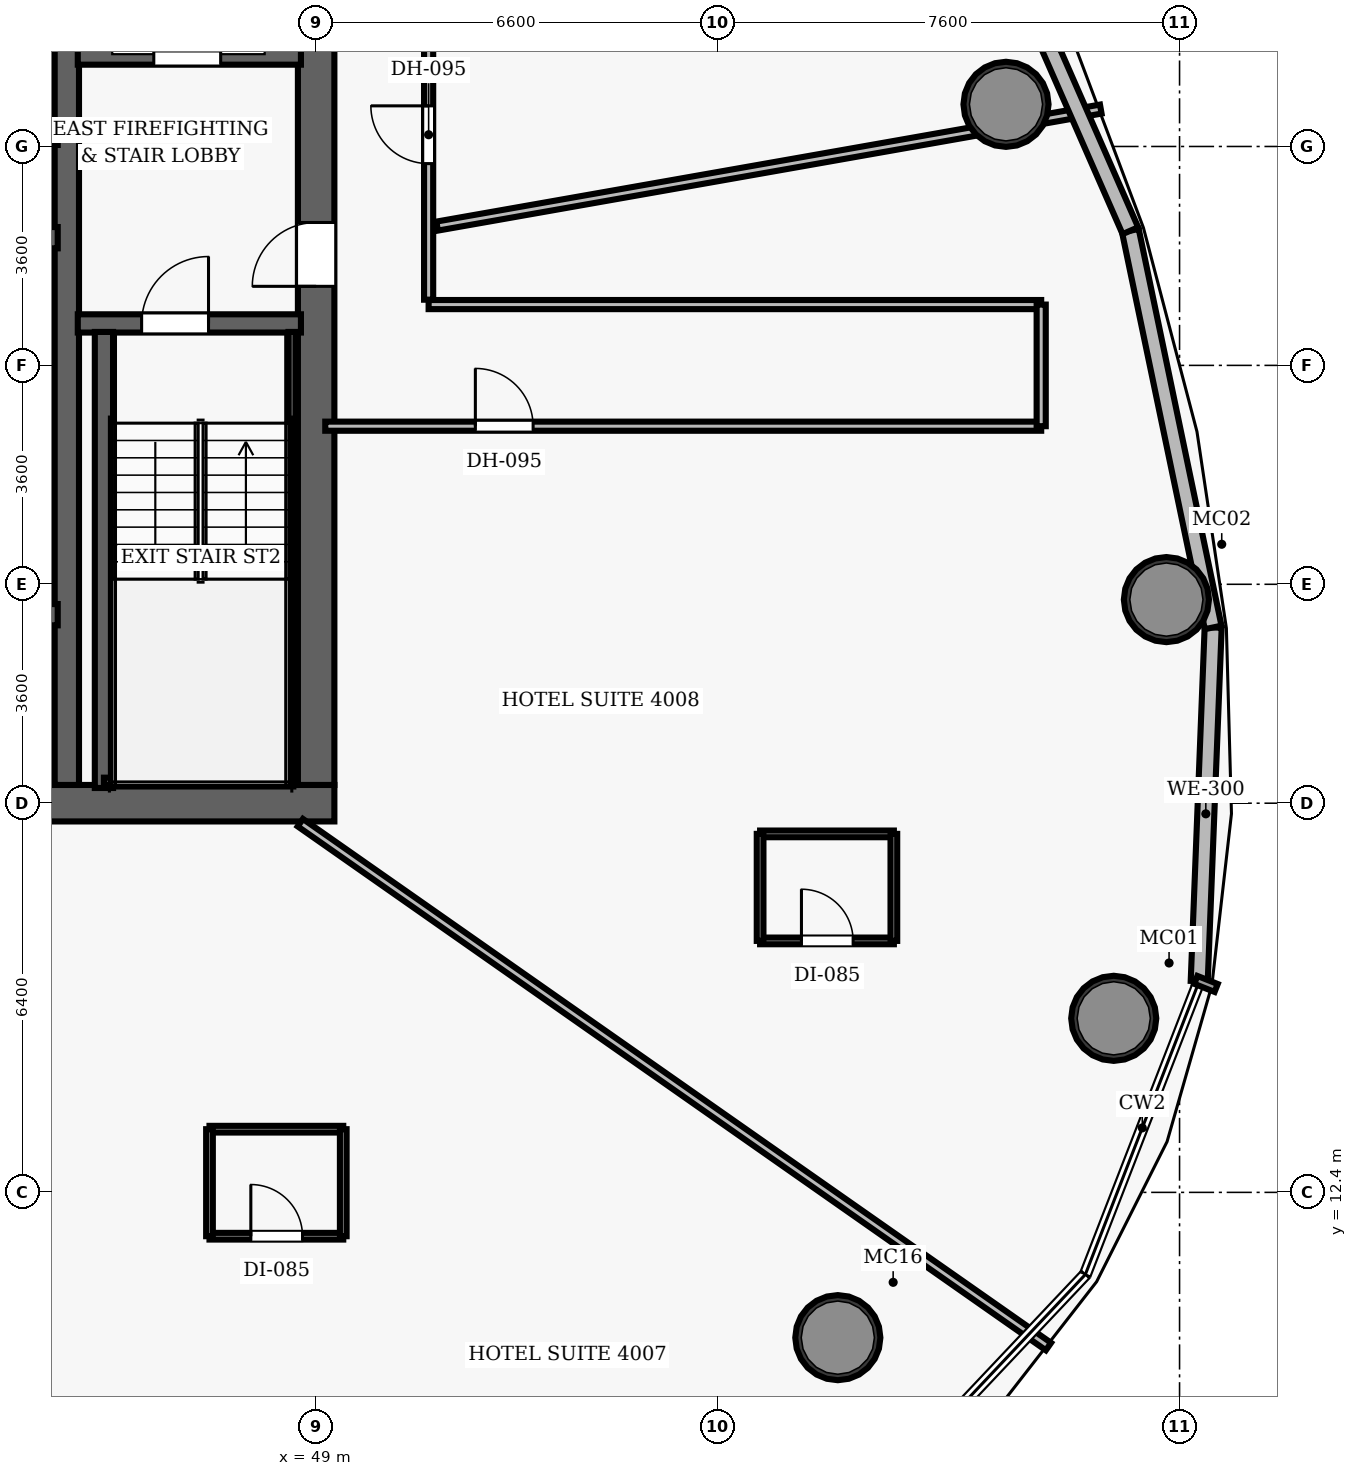
"""IFC4 building model, lengths in metres.
Left out: names, types, materials, properties, quantities, classifications, styles, units other than length and angle.
Written with IfcOpenShell. Run it as: python <this file> out.ifc"""

import sys

from ifc_helpers import new_model, si_unit, direction, frame, frame_2d, origin, origin_2d, place, context, subcontext, project, spatial, rectangle, hollow_circle, extrude, element, fill, save


model = new_model("IFC4")
c1 = context("Model", 3, precision=1e-05, world=origin(), true_north=direction((0.0, 1.0)))
c2 = subcontext(c1, "Body", "Model", "MODEL_VIEW")
j1 = project(units=[si_unit("LENGTHUNIT", "METRE"), si_unit("PLANEANGLEUNIT", "RADIAN")], contexts=[c1])
p1 = place(None, origin())
s1 = spatial("IfcSite", under=j1, at=p1, CompositionType="ELEMENT")
p2 = place(p1, origin())
s2 = spatial("IfcBuilding", under=s1, at=p2, CompositionType="ELEMENT")
p3 = place(p2, frame((0.0, 0.0, 158.8)))
s3 = spatial("IfcBuildingStorey", under=s2, at=p3, CompositionType="ELEMENT", Elevation=158.8)
p4 = place(p3, frame((26.7, 18.8, 0.0), z_axis=(0.0, 0.0, 1.0), x_axis=(1.0, 0.0, 0.0)))
e1 = element("IfcWall", 1, at=p4, inside=s3, PredefinedType="SHEAR", context=c2, shape_type="SweptSolid", body=[
    extrude(rectangle(XDim=22.6, YDim=0.6, at=frame_2d((11.3, 0.0))), origin(), (0.0, 0.0, 1.0), 3.5),
])
p5 = place(p4, frame((14.52, 0.0, 0.0)))
e2 = element("IfcOpeningElement", 2, at=p5, cuts=e1, PredefinedType="OPENING", context=c2, shape_type="SweptSolid", body=[
    extrude(rectangle(XDim=1.05, YDim=2.15, at=frame_2d((0.525, 1.075))), frame((0.0, 0.31, 0.0), z_axis=(0.0, -1.0, 0.0), x_axis=(1.0, 0.0, 0.0)), (0.0, 0.0, 1.0), 0.62),
])
p6 = place(p3, frame((49.0, 19.1, 0.0), z_axis=(0.0, 0.0, 1.0), x_axis=(0.0, 1.0, 0.0)))
e3 = element("IfcWall", 3, at=p6, inside=s3, PredefinedType="SHEAR", context=c2, shape_type="SweptSolid", body=[
    extrude(rectangle(XDim=13.8, YDim=0.6, at=frame_2d((6.9, 0.0))), origin(), (0.0, 0.0, 1.0), 3.5),
])
p7 = place(p6, frame((8.2, 0.0, 0.0)))
e4 = element("IfcOpeningElement", 4, at=p7, cuts=e3, PredefinedType="OPENING", context=c2, shape_type="SweptSolid", body=[
    extrude(rectangle(XDim=1.05, YDim=2.15, at=frame_2d((0.525, 1.075))), frame((0.0, 0.31, 0.0), z_axis=(0.0, -1.0, 0.0), x_axis=(1.0, 0.0, 0.0)), (0.0, 0.0, 1.0), 0.62),
])
p8 = place(p3, frame((44.9, 19.1, 0.0), z_axis=(0.0, 0.0, 1.0), x_axis=(0.0, 1.0, 0.0)))
e5 = element("IfcWall", 5, at=p8, inside=s3, PredefinedType="SHEAR", context=c2, shape_type="SweptSolid", body=[
    extrude(rectangle(XDim=13.8, YDim=0.4, at=frame_2d((6.9, 0.0))), origin(), (0.0, 0.0, 1.0), 3.5),
])
for number, where, z_axis, x_axis in (
    (6, (62.118, 15.262, 0.0), (0.0, 0.0, 1.0), (1.0, 0.0, 0.0)),
    (7, (62.984, 22.148, 0.0), (0.0, 0.0, 1.0), (1.0, 0.0, 0.0)),
    (8, (60.346, 30.293, 0.0), (0.0, 0.0, 1.0), (1.0, 0.0, 0.0)),
    (9, (57.58, 10.011, 0.0), (0.0, 0.0, 1.0), (1.0, 0.0, 0.0)),
):
    element("IfcColumn", number, at=place(p3, frame(where, z_axis=z_axis, x_axis=x_axis)), inside=s3, PredefinedType="COLUMN", context=c2, shape_type="SweptSolid", body=[
        extrude(hollow_circle(Radius=0.7, WallThickness=0.055, at=origin_2d()), origin(), (0.0, 0.0, 1.0), 3.5),
    ])
p9 = place(p3, frame((45.08, 26.69, 0.0), z_axis=(0.0, 0.0, 1.0), x_axis=(1.0, 0.0, 0.0)))
e10 = element("IfcWall", 10, at=p9, inside=s3, PredefinedType="SHEAR", context=c2, shape_type="SweptSolid", body=[
    extrude(rectangle(XDim=3.67, YDim=0.3, at=frame_2d((1.835, 0.0))), origin(), (0.0, 0.0, 1.0), 3.5),
])
p10 = place(p9, frame((1.05, 0.0, 0.0)))
e11 = element("IfcOpeningElement", 11, at=p10, cuts=e10, PredefinedType="OPENING", context=c2, shape_type="SweptSolid", body=[
    extrude(rectangle(XDim=1.1, YDim=2.15, at=frame_2d((0.55, 1.075))), frame((0.0, 0.16, 0.0), z_axis=(0.0, -1.0, 0.0), x_axis=(1.0, 0.0, 0.0)), (0.0, 0.0, 1.0), 0.32),
])
p11 = place(p3, frame((45.51, 19.05, 0.0), z_axis=(0.0, 0.0, 1.0), x_axis=(0.0, 1.0, 0.0)))
e12 = element("IfcWall", 12, at=p11, inside=s3, PredefinedType="SHEAR", context=c2, shape_type="SweptSolid", body=[
    extrude(rectangle(XDim=7.5, YDim=0.3, at=frame_2d((3.75, 0.0))), origin(), (0.0, 0.0, 1.0), 3.5),
])
p12 = place(p3, frame((48.605, 19.1, 0.0), z_axis=(0.0, 0.0, 1.0), x_axis=(0.0, 1.0, 0.0)))
e13 = element("IfcWall", 13, at=p12, inside=s3, PredefinedType="SHEAR", context=c2, shape_type="SweptSolid", body=[
    extrude(rectangle(XDim=7.45, YDim=0.12, at=frame_2d((3.725, 0.0))), origin(), (0.0, 0.0, 1.0), 3.5),
])
p13 = place(p3, frame((45.51, 19.16, 0.0), z_axis=(0.0, 0.0, 1.0), x_axis=(1.0, 0.0, 0.0)))
e14 = element("IfcWall", 14, at=p13, inside=s3, PredefinedType="SHEAR", context=c2, shape_type="SweptSolid", body=[
    extrude(rectangle(XDim=3.095, YDim=0.12, at=frame_2d((1.547, 0.0))), origin(), (0.0, 0.0, 1.0), 3.5),
])
p14 = place(p3, frame((45.08, 31.12, 0.0), z_axis=(0.0, 0.0, 1.0), x_axis=(1.0, 0.0, 0.0)))
e15 = element("IfcWall", 15, at=p14, inside=s3, PredefinedType="SHEAR", context=c2, shape_type="SweptSolid", body=[
    extrude(rectangle(XDim=3.67, YDim=0.35, at=frame_2d((1.835, 0.0))), origin(), (0.0, 0.0, 1.0), 2.675),
])
p15 = place(p14, frame((1.25, 0.0, 0.0)))
e16 = element("IfcOpeningElement", 16, at=p15, cuts=e15, PredefinedType="OPENING", context=c2, shape_type="SweptSolid", body=[
    extrude(rectangle(XDim=1.1, YDim=2.15, at=frame_2d((0.55, 1.075))), frame((0.0, 0.185, 0.0), z_axis=(0.0, -1.0, 0.0), x_axis=(1.0, 0.0, 0.0)), (0.0, 0.0, 1.0), 0.37),
])
for number, where, z_axis, x_axis in (
    (17, (42.72, 21.9, 0.0), (0.0, 0.0, 1.0), (1.0, 0.0, 0.0)),
    (18, (42.72, 28.1, 0.0), (0.0, 0.0, 1.0), (1.0, 0.0, 0.0)),
):
    element("IfcWall", number, at=place(p3, frame(where, z_axis=z_axis, x_axis=x_axis)), inside=s3, PredefinedType="SHEAR", context=c2, shape_type="SweptSolid", body=[
        extrude(rectangle(XDim=2.03, YDim=0.35, at=frame_2d((1.015, 0.0))), origin(), (0.0, 0.0, 1.0), 2.675),
    ])
p16 = place(p3, frame((42.55, 29.68, 0.0), z_axis=(0.0, 0.0, 1.0), x_axis=(1.0, 0.0, 0.0)))
e19 = element("IfcWall", 19, at=p16, inside=s3, PredefinedType="PARTITIONING", context=c2, shape_type="SweptSolid", body=[
    extrude(rectangle(XDim=2.2, YDim=0.11, at=frame_2d((1.1, 0.0))), origin(), (0.0, 0.0, 1.0), 2.675),
])
p17 = place(p3, frame((50.85, 27.08, 0.0), z_axis=(0.0, 0.0, 1.0), x_axis=(0.0, 1.0, 0.0)))
e20 = element("IfcWall", 20, at=p17, inside=s3, PredefinedType="PARTITIONING", context=c2, shape_type="SweptSolid", body=[
    extrude(rectangle(XDim=8.12, YDim=0.15, at=frame_2d((4.06, 0.0))), origin(), (0.0, 0.0, 1.0), 2.675),
])
p18 = place(p17, frame((2.238, 0.0, 0.0)))
e21 = element("IfcOpeningElement", 21, at=p18, cuts=e20, PredefinedType="OPENING", context=c2, shape_type="SweptSolid", body=[
    extrude(rectangle(XDim=0.95, YDim=2.15, at=frame_2d((0.475, 1.075))), frame((0.0, 0.085, 0.0), z_axis=(0.0, -1.0, 0.0), x_axis=(1.0, 0.0, 0.0)), (0.0, 0.0, 1.0), 0.17),
])
p19 = place(p3, frame((50.85, 27.0, 0.0), z_axis=(0.0, 0.0, 1.0), x_axis=(1.0, 0.0, 0.0)))
e22 = element("IfcWall", 22, at=p19, inside=s3, PredefinedType="PARTITIONING", context=c2, shape_type="SweptSolid", body=[
    extrude(rectangle(XDim=10.074, YDim=0.15, at=frame_2d((5.037, 0.0))), origin(), (0.0, 0.0, 1.0), 2.675),
])
p20 = place(p3, frame((49.15, 25.0, 0.0), z_axis=(0.0, 0.0, 1.0), x_axis=(1.0, 0.0, 0.0)))
e23 = element("IfcWall", 23, at=p20, inside=s3, PredefinedType="PARTITIONING", context=c2, shape_type="SweptSolid", body=[
    extrude(rectangle(XDim=11.775, YDim=0.15, at=frame_2d((5.887, 0.0))), origin(), (0.0, 0.0, 1.0), 2.675),
])
p21 = place(p20, frame((2.469, 0.0, 0.0)))
e24 = element("IfcOpeningElement", 24, at=p21, cuts=e23, PredefinedType="OPENING", context=c2, shape_type="SweptSolid", body=[
    extrude(rectangle(XDim=0.95, YDim=2.15, at=frame_2d((0.475, 1.075))), frame((0.0, 0.085, 0.0), z_axis=(0.0, -1.0, 0.0), x_axis=(1.0, 0.0, 0.0)), (0.0, 0.0, 1.0), 0.17),
])
p22 = place(p3, frame((60.925, 25.0, 0.0), z_axis=(0.0, 0.0, 1.0), x_axis=(0.0, 1.0, 0.0)))
e25 = element("IfcWall", 25, at=p22, inside=s3, PredefinedType="PARTITIONING", context=c2, shape_type="SweptSolid", body=[
    extrude(rectangle(XDim=2.0, YDim=0.15, at=frame_2d((1.0, 0.0))), origin(), (0.0, 0.0, 1.0), 2.675),
])
p23 = place(p3, frame((50.99, 28.291, 0.0), z_axis=(0.0, 0.0, 1.0), x_axis=(0.984807278352, 0.173650869576, 0.0)))
e26 = element("IfcWall", 26, at=p23, inside=s3, PredefinedType="PARTITIONING", context=c2, shape_type="SweptSolid", body=[
    extrude(rectangle(XDim=11.083, YDim=0.15, at=frame_2d((5.542, 0.0))), origin(), (0.0, 0.0, 1.0), 2.675),
])
p24 = place(p3, frame((48.74, 18.48, 0.0), z_axis=(0.0, 0.0, 1.0), x_axis=(0.819152498756, -0.573575787305, 0.0)))
e27 = element("IfcWall", 27, at=p24, inside=s3, PredefinedType="PARTITIONING", context=c2, shape_type="SweptSolid", body=[
    extrude(rectangle(XDim=15.021, YDim=0.15, at=frame_2d((7.51, 0.0))), origin(), (0.0, 0.0, 1.0), 2.675),
])
p25 = place(p3, frame((47.246, 11.679, 0.0), z_axis=(0.0, 0.0, 1.0), x_axis=(1.0, 0.0, 0.0)))
e28 = element("IfcWall", 28, at=p25, inside=s3, PredefinedType="PARTITIONING", context=c2, shape_type="SweptSolid", body=[
    extrude(rectangle(XDim=2.2, YDim=0.11, at=frame_2d((1.1, 0.0))), origin(), (0.0, 0.0, 1.0), 2.675),
])
p26 = place(p25, frame((0.68, 0.0, 0.0)))
e29 = element("IfcOpeningElement", 29, at=p26, cuts=e28, PredefinedType="OPENING", context=c2, shape_type="SweptSolid", body=[
    extrude(rectangle(XDim=0.85, YDim=2.1, at=frame_2d((0.425, 1.05))), frame((0.0, 0.065, 0.0), z_axis=(0.0, -1.0, 0.0), x_axis=(1.0, 0.0, 0.0)), (0.0, 0.0, 1.0), 0.13),
])
p27 = place(p3, frame((47.246, 13.439, 0.0), z_axis=(0.0, 0.0, 1.0), x_axis=(1.0, 0.0, 0.0)))
e30 = element("IfcWall", 30, at=p27, inside=s3, PredefinedType="PARTITIONING", context=c2, shape_type="SweptSolid", body=[
    extrude(rectangle(XDim=2.2, YDim=0.11, at=frame_2d((1.1, 0.0))), origin(), (0.0, 0.0, 1.0), 2.675),
])
for number, where, z_axis, x_axis in (
    (31, (47.246, 11.679, 0.0), (0.0, 0.0, 1.0), (0.0, 1.0, 0.0)),
    (32, (49.446, 11.679, 0.0), (0.0, 0.0, 1.0), (0.0, 1.0, 0.0)),
):
    element("IfcWall", number, at=place(p3, frame(where, z_axis=z_axis, x_axis=x_axis)), inside=s3, PredefinedType="PARTITIONING", context=c2, shape_type="SweptSolid", body=[
        extrude(rectangle(XDim=1.76, YDim=0.11, at=frame_2d((0.88, 0.0))), origin(), (0.0, 0.0, 1.0), 2.675),
    ])
p28 = place(p3, frame((56.302, 16.535, 0.0), z_axis=(0.0, 0.0, 1.0), x_axis=(1.0, 0.0, 0.0)))
e33 = element("IfcWall", 33, at=p28, inside=s3, PredefinedType="PARTITIONING", context=c2, shape_type="SweptSolid", body=[
    extrude(rectangle(XDim=2.2, YDim=0.11, at=frame_2d((1.1, 0.0))), origin(), (0.0, 0.0, 1.0), 2.675),
])
p29 = place(p28, frame((0.68, 0.0, 0.0)))
e34 = element("IfcOpeningElement", 34, at=p29, cuts=e33, PredefinedType="OPENING", context=c2, shape_type="SweptSolid", body=[
    extrude(rectangle(XDim=0.85, YDim=2.1, at=frame_2d((0.425, 1.05))), frame((0.0, 0.065, 0.0), z_axis=(0.0, -1.0, 0.0), x_axis=(1.0, 0.0, 0.0)), (0.0, 0.0, 1.0), 0.13),
])
p30 = place(p3, frame((56.302, 18.295, 0.0), z_axis=(0.0, 0.0, 1.0), x_axis=(1.0, 0.0, 0.0)))
e35 = element("IfcWall", 35, at=p30, inside=s3, PredefinedType="PARTITIONING", context=c2, shape_type="SweptSolid", body=[
    extrude(rectangle(XDim=2.2, YDim=0.11, at=frame_2d((1.1, 0.0))), origin(), (0.0, 0.0, 1.0), 2.675),
])
for number, where, z_axis, x_axis in (
    (36, (56.302, 16.535, 0.0), (0.0, 0.0, 1.0), (0.0, 1.0, 0.0)),
    (37, (58.501, 16.535, 0.0), (0.0, 0.0, 1.0), (0.0, 1.0, 0.0)),
):
    element("IfcWall", number, at=place(p3, frame(where, z_axis=z_axis, x_axis=x_axis)), inside=s3, PredefinedType="PARTITIONING", context=c2, shape_type="SweptSolid", body=[
        extrude(rectangle(XDim=1.76, YDim=0.11, at=frame_2d((0.88, 0.0))), origin(), (0.0, 0.0, 1.0), 2.675),
    ])
p31 = place(p3, frame((63.753, 21.69, 0.0), z_axis=(0.0, 0.0, 1.0), x_axis=(-0.039371907334, -0.999224625854, 0.0)))
e38 = element("IfcWall", 38, at=p31, inside=s3, PredefinedType="SOLIDWALL", context=c2, shape_type="SweptSolid", body=[
    extrude(rectangle(XDim=5.823, YDim=0.28, at=frame_2d((2.911, 0.0))), origin(), (0.0, 0.0, 1.0), 3.26),
])
p32 = place(p3, frame((62.391, 28.215, 0.0), z_axis=(0.0, 0.0, 1.0), x_axis=(0.20428043062, -0.978912409598, 0.0)))
e39 = element("IfcWall", 39, at=p32, inside=s3, PredefinedType="SOLIDWALL", context=c2, shape_type="SweptSolid", body=[
    extrude(rectangle(XDim=6.665, YDim=0.28, at=frame_2d((3.333, 0.0))), origin(), (0.0, 0.0, 1.0), 3.26),
])
p33 = place(p3, frame((59.463, 34.893, 0.0), z_axis=(0.0, 0.0, 1.0), x_axis=(0.401510744886, -0.915854312509, 0.0)))
e40 = element("IfcWall", 40, at=p33, inside=s3, PredefinedType="SOLIDWALL", context=c2, shape_type="SweptSolid", body=[
    extrude(rectangle(XDim=7.292, YDim=0.28, at=frame_2d((3.646, 0.0))), origin(), (0.0, 0.0, 1.0), 3.26),
])
p34 = place(p10, origin())
e41 = element("IfcDoor", 41, at=p34, inside=s3, OperationType="SINGLE_SWING_RIGHT", PredefinedType="DOOR", context=c2, shape_type="SweptSolid", body=[
    extrude(rectangle(XDim=1.1, YDim=2.15, at=frame_2d((0.55, 1.075))), frame((0.0, 0.025, 0.0), z_axis=(0.0, -1.0, 0.0), x_axis=(1.0, 0.0, 0.0)), (0.0, 0.0, 1.0), 0.05),
])
fill(e11, e41)
p35 = place(p7, origin())
e42 = element("IfcDoor", 42, at=p35, inside=s3, OperationType="SINGLE_SWING_LEFT", PredefinedType="DOOR", context=c2, shape_type="SweptSolid", body=[
    extrude(rectangle(XDim=1.05, YDim=2.15, at=frame_2d((0.525, 1.075))), frame((0.0, 0.025, 0.0), z_axis=(0.0, -1.0, 0.0), x_axis=(1.0, 0.0, 0.0)), (0.0, 0.0, 1.0), 0.05),
])
fill(e4, e42)
p36 = place(p18, origin())
e43 = element("IfcDoor", 43, at=p36, inside=s3, OperationType="SINGLE_SWING_RIGHT", PredefinedType="DOOR", context=c2, shape_type="SweptSolid", body=[
    extrude(rectangle(XDim=0.95, YDim=2.15, at=frame_2d((0.475, 1.075))), frame((0.0, 0.025, 0.0), z_axis=(0.0, -1.0, 0.0), x_axis=(1.0, 0.0, 0.0)), (0.0, 0.0, 1.0), 0.05),
])
fill(e21, e43)
p37 = place(p26, origin())
e44 = element("IfcDoor", 44, at=p37, inside=s3, OperationType="SINGLE_SWING_LEFT", PredefinedType="DOOR", context=c2, shape_type="SweptSolid", body=[
    extrude(rectangle(XDim=0.85, YDim=2.1, at=frame_2d((0.425, 1.05))), frame((0.0, 0.025, 0.0), z_axis=(0.0, -1.0, 0.0), x_axis=(1.0, 0.0, 0.0)), (0.0, 0.0, 1.0), 0.05),
])
fill(e29, e44)
p38 = place(p21, origin())
e45 = element("IfcDoor", 45, at=p38, inside=s3, OperationType="SINGLE_SWING_LEFT", PredefinedType="DOOR", context=c2, shape_type="SweptSolid", body=[
    extrude(rectangle(XDim=0.95, YDim=2.15, at=frame_2d((0.475, 1.075))), frame((0.0, 0.025, 0.0), z_axis=(0.0, -1.0, 0.0), x_axis=(1.0, 0.0, 0.0)), (0.0, 0.0, 1.0), 0.05),
])
fill(e24, e45)
p39 = place(p29, origin())
e46 = element("IfcDoor", 46, at=p39, inside=s3, OperationType="SINGLE_SWING_LEFT", PredefinedType="DOOR", context=c2, shape_type="SweptSolid", body=[
    extrude(rectangle(XDim=0.85, YDim=2.1, at=frame_2d((0.425, 1.05))), frame((0.0, 0.025, 0.0), z_axis=(0.0, -1.0, 0.0), x_axis=(1.0, 0.0, 0.0)), (0.0, 0.0, 1.0), 0.05),
])
fill(e34, e46)
p40 = place(p15, origin())
e47 = element("IfcDoor", 47, at=p40, inside=s3, OperationType="SLIDING_TO_LEFT", PredefinedType="DOOR", context=c2, shape_type="SweptSolid", body=[
    extrude(rectangle(XDim=1.1, YDim=2.15, at=frame_2d((0.55, 1.075))), frame((0.0, 0.025, 0.0), z_axis=(0.0, -1.0, 0.0), x_axis=(1.0, 0.0, 0.0)), (0.0, 0.0, 1.0), 0.05),
])
fill(e16, e47)
save(model, sys.argv[1])
